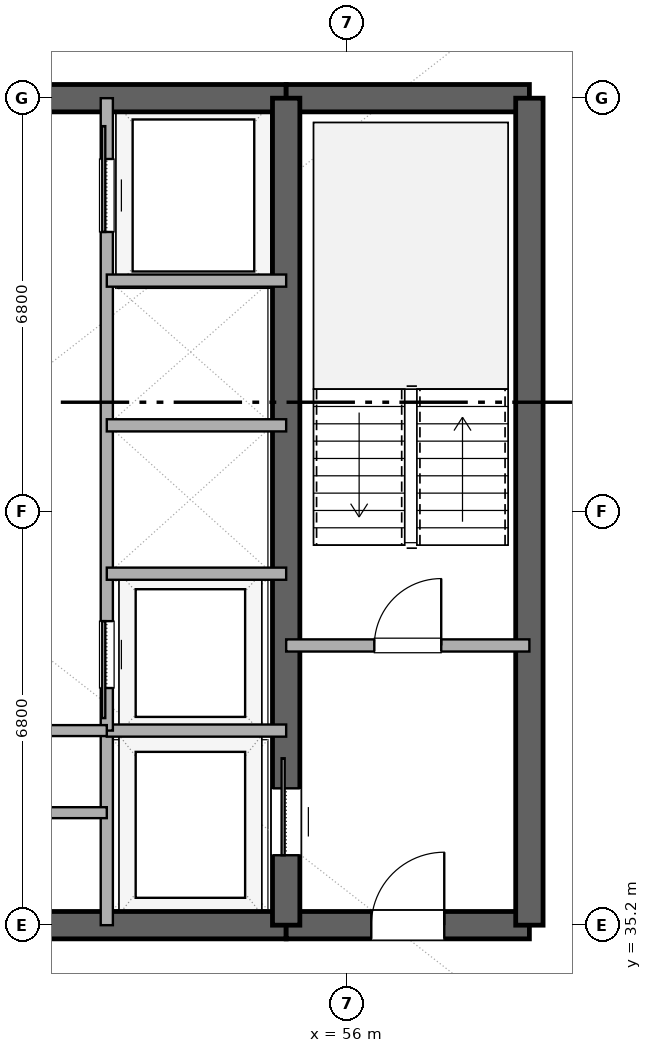
"""IFC4 building model, lengths in metres.
Left out: names, types, materials, properties, quantities, classifications, styles, units other than length and angle.
Written with IfcOpenShell. Run it as: python <this file> out.ifc"""

import sys

from ifc_helpers import new_model, si_unit, direction, frame, frame_2d, origin, place, context, subcontext, project, spatial, rectangle, extrude, element, fill, save


model = new_model("IFC4")
c1 = context("Model", 3, precision=1e-05, world=origin(), true_north=direction((0.0, 1.0)))
c2 = subcontext(c1, "Body", "Model", "MODEL_VIEW")
j1 = project(units=[si_unit("LENGTHUNIT", "METRE"), si_unit("PLANEANGLEUNIT", "RADIAN")], contexts=[c1])
p1 = place(None, origin())
s1 = spatial("IfcSite", under=j1, at=p1, CompositionType="ELEMENT")
p2 = place(p1, origin())
s2 = spatial("IfcBuilding", under=s1, at=p2, CompositionType="ELEMENT")
p3 = place(p2, frame((0.0, 0.0, 150.6)))
s3 = spatial("IfcBuildingStorey", under=s2, at=p3, CompositionType="ELEMENT", Elevation=150.6)
p4 = place(p3, frame((41.0, 35.2, 0.0), z_axis=(0.0, 0.0, 1.0), x_axis=(1.0, 0.0, 0.0)))
e1 = element("IfcWall", 1, at=p4, inside=s3, PredefinedType="SHEAR", context=c2, shape_type="SweptSolid", body=[
    extrude(rectangle(XDim=14.0, YDim=0.45, at=frame_2d((7.0, 0.0))), origin(), (0.0, 0.0, 1.0), 3.38),
])
p5 = place(p4, frame((6.1, 0.0, 0.0)))
e2 = element("IfcOpeningElement", 2, at=p5, cuts=e1, PredefinedType="OPENING", context=c2, shape_type="SweptSolid", body=[
    extrude(rectangle(XDim=1.8, YDim=2.25, at=frame_2d((0.9, 1.125))), frame((0.0, 0.235, 0.0), z_axis=(0.0, -1.0, 0.0), x_axis=(1.0, 0.0, 0.0)), (0.0, 0.0, 1.0), 0.47),
])
p6 = place(p3, frame((55.0, 35.2, 0.0), z_axis=(0.0, 0.0, 1.0), x_axis=(1.0, 0.0, 0.0)))
e3 = element("IfcWall", 3, at=p6, inside=s3, PredefinedType="SHEAR", context=c2, shape_type="SweptSolid", body=[
    extrude(rectangle(XDim=4.0, YDim=0.45, at=frame_2d((2.0, 0.0))), origin(), (0.0, 0.0, 1.0), 3.38),
])
p7 = place(p6, frame((1.4, 0.0, 0.0)))
e4 = element("IfcOpeningElement", 4, at=p7, cuts=e3, PredefinedType="OPENING", context=c2, shape_type="SweptSolid", body=[
    extrude(rectangle(XDim=1.2, YDim=2.15, at=frame_2d((0.6, 1.075))), frame((0.0, 0.235, 0.0), z_axis=(0.0, -1.0, 0.0), x_axis=(1.0, 0.0, 0.0)), (0.0, 0.0, 1.0), 0.47),
])
p8 = place(p3, frame((41.0, 48.8, 0.0), z_axis=(0.0, 0.0, 1.0), x_axis=(1.0, 0.0, 0.0)))
e5 = element("IfcWall", 5, at=p8, inside=s3, PredefinedType="SHEAR", context=c2, shape_type="SweptSolid", body=[
    extrude(rectangle(XDim=14.0, YDim=0.45, at=frame_2d((7.0, 0.0))), origin(), (0.0, 0.0, 1.0), 3.38),
])
p9 = place(p8, frame((6.1, 0.0, 0.0)))
e6 = element("IfcOpeningElement", 6, at=p9, cuts=e5, PredefinedType="OPENING", context=c2, shape_type="SweptSolid", body=[
    extrude(rectangle(XDim=1.8, YDim=2.25, at=frame_2d((0.9, 1.125))), frame((0.0, 0.235, 0.0), z_axis=(0.0, -1.0, 0.0), x_axis=(1.0, 0.0, 0.0)), (0.0, 0.0, 1.0), 0.47),
])
p10 = place(p3, frame((55.0, 48.8, 0.0), z_axis=(0.0, 0.0, 1.0), x_axis=(1.0, 0.0, 0.0)))
e7 = element("IfcWall", 7, at=p10, inside=s3, PredefinedType="SHEAR", context=c2, shape_type="SweptSolid", body=[
    extrude(rectangle(XDim=4.0, YDim=0.45, at=frame_2d((2.0, 0.0))), origin(), (0.0, 0.0, 1.0), 3.38),
])
p11 = place(p3, frame((59.0, 35.2, 0.0), z_axis=(0.0, 0.0, 1.0), x_axis=(0.0, 1.0, 0.0)))
e8 = element("IfcWall", 8, at=p11, inside=s3, PredefinedType="SHEAR", context=c2, shape_type="SweptSolid", body=[
    extrude(rectangle(XDim=13.6, YDim=0.45, at=frame_2d((6.8, 0.0))), origin(), (0.0, 0.0, 1.0), 3.38),
])
p12 = place(p3, frame((55.0, 35.2, 0.0), z_axis=(0.0, 0.0, 1.0), x_axis=(0.0, 1.0, 0.0)))
e9 = element("IfcWall", 9, at=p12, inside=s3, PredefinedType="SHEAR", context=c2, shape_type="SweptSolid", body=[
    extrude(rectangle(XDim=13.6, YDim=0.45, at=frame_2d((6.8, 0.0))), origin(), (0.0, 0.0, 1.0), 3.38),
])
p13 = place(p12, frame((1.15, 0.0, 0.0)))
e10 = element("IfcOpeningElement", 10, at=p13, cuts=e9, PredefinedType="OPENING", context=c2, shape_type="SweptSolid", body=[
    extrude(rectangle(XDim=1.1, YDim=2.2, at=frame_2d((0.55, 1.1))), frame((0.0, 0.235, 0.0), z_axis=(0.0, -1.0, 0.0), x_axis=(1.0, 0.0, 0.0)), (0.0, 0.0, 1.0), 0.47),
])
p14 = place(p3, frame((55.0, 39.8, 0.0), z_axis=(0.0, 0.0, 1.0), x_axis=(1.0, 0.0, 0.0)))
e11 = element("IfcWall", 11, at=p14, inside=s3, PredefinedType="SOLIDWALL", context=c2, shape_type="SweptSolid", body=[
    extrude(rectangle(XDim=4.0, YDim=0.2, at=frame_2d((2.0, 0.0))), origin(), (0.0, 0.0, 1.0), 2.74),
])
p15 = place(p14, frame((1.45, 0.0, 0.0)))
e12 = element("IfcOpeningElement", 12, at=p15, cuts=e11, PredefinedType="OPENING", context=c2, shape_type="SweptSolid", body=[
    extrude(rectangle(XDim=1.1, YDim=2.15, at=frame_2d((0.55, 1.075))), frame((0.0, 0.11, 0.0), z_axis=(0.0, -1.0, 0.0), x_axis=(1.0, 0.0, 0.0)), (0.0, 0.0, 1.0), 0.22),
])
p16 = place(p3, frame((52.05, 35.2, 0.0), z_axis=(0.0, 0.0, 1.0), x_axis=(0.0, 1.0, 0.0)))
e13 = element("IfcWall", 13, at=p16, inside=s3, PredefinedType="SOLIDWALL", context=c2, shape_type="SweptSolid", body=[
    extrude(rectangle(XDim=3.2, YDim=0.2, at=frame_2d((1.6, 0.0))), origin(), (0.0, 0.0, 1.0), 2.74),
])
p17 = place(p3, frame((52.05, 38.4, 0.0), z_axis=(0.0, 0.0, 1.0), x_axis=(1.0, 0.0, 0.0)))
e14 = element("IfcWall", 14, at=p17, inside=s3, PredefinedType="SOLIDWALL", context=c2, shape_type="SweptSolid", body=[
    extrude(rectangle(XDim=2.95, YDim=0.2, at=frame_2d((1.475, 0.0))), origin(), (0.0, 0.0, 1.0), 2.74),
])
p18 = place(p3, frame((52.05, 38.4, 0.0), z_axis=(0.0, 0.0, 1.0), x_axis=(0.0, 1.0, 0.0)))
e15 = element("IfcWall", 15, at=p18, inside=s3, PredefinedType="SOLIDWALL", context=c2, shape_type="SweptSolid", body=[
    extrude(rectangle(XDim=10.4, YDim=0.2, at=frame_2d((5.2, 0.0))), origin(), (0.0, 0.0, 1.0), 2.74),
])
p19 = place(p18, frame((0.7, 0.0, 0.0)))
e16 = element("IfcOpeningElement", 16, at=p19, cuts=e15, PredefinedType="OPENING", context=c2, shape_type="SweptSolid", body=[
    extrude(rectangle(XDim=1.1, YDim=2.2, at=frame_2d((0.55, 1.1))), frame((0.0, 0.11, 0.0), z_axis=(0.0, -1.0, 0.0), x_axis=(1.0, 0.0, 0.0)), (0.0, 0.0, 1.0), 0.22),
])
p20 = place(p18, frame((8.2, 0.0, 0.0)))
e17 = element("IfcOpeningElement", 17, at=p20, cuts=e15, PredefinedType="OPENING", context=c2, shape_type="SweptSolid", body=[
    extrude(rectangle(XDim=1.2, YDim=2.2, at=frame_2d((0.6, 1.1))), frame((0.0, 0.11, 0.0), z_axis=(0.0, -1.0, 0.0), x_axis=(1.0, 0.0, 0.0)), (0.0, 0.0, 1.0), 0.22),
])
for number, where, z_axis, x_axis in (
    (18, (52.05, 40.98, 0.0), (0.0, 0.0, 1.0), (1.0, 0.0, 0.0)),
    (19, (52.05, 43.42, 0.0), (0.0, 0.0, 1.0), (1.0, 0.0, 0.0)),
    (20, (52.05, 45.8, 0.0), (0.0, 0.0, 1.0), (1.0, 0.0, 0.0)),
):
    element("IfcWall", number, at=place(p3, frame(where, z_axis=z_axis, x_axis=x_axis)), inside=s3, PredefinedType="SOLIDWALL", context=c2, shape_type="SweptSolid", body=[
        extrude(rectangle(XDim=2.95, YDim=0.2, at=frame_2d((1.475, 0.0))), origin(), (0.0, 0.0, 1.0), 2.74),
    ])
for number, where, z_axis, x_axis in (
    (21, (49.2, 37.05, 0.0), (0.0, 0.0, 1.0), (1.0, 0.0, 0.0)),
    (22, (49.2, 38.4, 0.0), (0.0, 0.0, 1.0), (1.0, 0.0, 0.0)),
):
    element("IfcWall", number, at=place(p3, frame(where, z_axis=z_axis, x_axis=x_axis)), inside=s3, PredefinedType="PLUMBINGWALL", context=c2, shape_type="SweptSolid", body=[
        extrude(rectangle(XDim=2.85, YDim=0.18, at=frame_2d((1.425, 0.0))), origin(), (0.0, 0.0, 1.0), 2.74),
    ])
p21 = place(p13, origin())
e23 = element("IfcDoor", 23, at=p21, inside=s3, OperationType="SLIDING_TO_RIGHT", PredefinedType="DOOR", context=c2, shape_type="SweptSolid", body=[
    extrude(rectangle(XDim=1.1, YDim=2.2, at=frame_2d((0.55, 1.1))), frame((0.0, 0.025, 0.0), z_axis=(0.0, -1.0, 0.0), x_axis=(1.0, 0.0, 0.0)), (0.0, 0.0, 1.0), 0.05),
])
fill(e10, e23)
p22 = place(p7, origin())
e24 = element("IfcDoor", 24, at=p22, inside=s3, OperationType="SINGLE_SWING_RIGHT", PredefinedType="DOOR", context=c2, shape_type="SweptSolid", body=[
    extrude(rectangle(XDim=1.2, YDim=2.15, at=frame_2d((0.6, 1.075))), frame((0.0, 0.025, 0.0), z_axis=(0.0, -1.0, 0.0), x_axis=(1.0, 0.0, 0.0)), (0.0, 0.0, 1.0), 0.05),
])
fill(e4, e24)
p23 = place(p15, origin())
e25 = element("IfcDoor", 25, at=p23, inside=s3, OperationType="SINGLE_SWING_RIGHT", PredefinedType="DOOR", context=c2, shape_type="SweptSolid", body=[
    extrude(rectangle(XDim=1.1, YDim=2.15, at=frame_2d((0.55, 1.075))), frame((0.0, 0.025, 0.0), z_axis=(0.0, -1.0, 0.0), x_axis=(1.0, 0.0, 0.0)), (0.0, 0.0, 1.0), 0.05),
])
fill(e12, e25)
p24 = place(p19, origin())
e26 = element("IfcDoor", 26, at=p24, inside=s3, OperationType="SLIDING_TO_LEFT", PredefinedType="DOOR", context=c2, shape_type="SweptSolid", body=[
    extrude(rectangle(XDim=1.1, YDim=2.2, at=frame_2d((0.55, 1.1))), frame((0.0, 0.025, 0.0), z_axis=(0.0, -1.0, 0.0), x_axis=(1.0, 0.0, 0.0)), (0.0, 0.0, 1.0), 0.05),
])
fill(e16, e26)
p25 = place(p20, origin())
e27 = element("IfcDoor", 27, at=p25, inside=s3, OperationType="SLIDING_TO_RIGHT", PredefinedType="DOOR", context=c2, shape_type="SweptSolid", body=[
    extrude(rectangle(XDim=1.2, YDim=2.2, at=frame_2d((0.6, 1.1))), frame((0.0, 0.025, 0.0), z_axis=(0.0, -1.0, 0.0), x_axis=(1.0, 0.0, 0.0)), (0.0, 0.0, 1.0), 0.05),
])
fill(e17, e27)
save(model, sys.argv[1])
